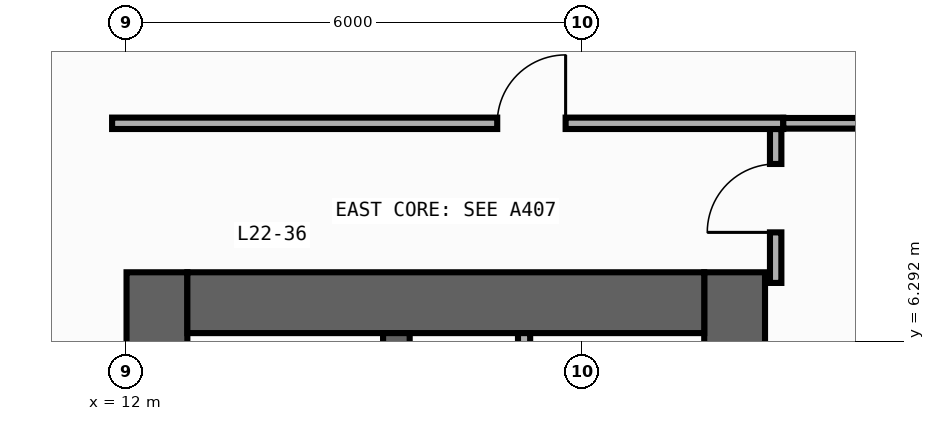
"""IFC4 building model, lengths in metres.
Left out: names, types, materials, properties, quantities, classifications, styles, units other than length and angle.
Written with IfcOpenShell. Run it as: python <this file> out.ifc"""

import sys

from ifc_helpers import new_model, si_unit, direction, frame, frame_2d, origin, place, context, subcontext, project, spatial, rectangle, extrude, element, fill, save


model = new_model("IFC4")
c1 = context("Model", 3, precision=1e-05, world=origin(), true_north=direction((0.0, 1.0)))
c2 = subcontext(c1, "Body", "Model", "MODEL_VIEW")
j1 = project(units=[si_unit("LENGTHUNIT", "METRE"), si_unit("PLANEANGLEUNIT", "RADIAN")], contexts=[c1])
p1 = place(None, origin())
s1 = spatial("IfcSite", under=j1, at=p1, CompositionType="ELEMENT")
p2 = place(p1, origin())
s2 = spatial("IfcBuilding", under=s1, at=p2, CompositionType="ELEMENT")
p3 = place(p2, frame((0.0, 0.0, 97.4)))
s3 = spatial("IfcBuildingStorey", under=s2, at=p3, CompositionType="ELEMENT", Elevation=97.4)
p4 = place(p3, frame((12.4, -19.8, 0.0), z_axis=(0.0, 0.0, 1.0), x_axis=(0.0, 1.0, 0.0)))
e1 = element("IfcWall", 1, at=p4, inside=s3, PredefinedType="SHEAR", context=c2, shape_type="SweptSolid", body=[
    extrude(rectangle(XDim=27.0, YDim=0.8, at=frame_2d((13.5, 0.0))), origin(), (0.0, 0.0, 1.0), 3.94),
])
p5 = place(p4, frame((23.05, 0.0, 0.0)))
e2 = element("IfcOpeningElement", 2, at=p5, cuts=e1, PredefinedType="OPENING", context=c2, shape_type="SweptSolid", body=[
    extrude(rectangle(XDim=1.1, YDim=2.2, at=frame_2d((0.55, 1.1))), frame((0.0, 0.41, 0.0), z_axis=(0.0, -1.0, 0.0), x_axis=(1.0, 0.0, 0.0)), (0.0, 0.0, 1.0), 0.82),
])
p6 = place(p4, frame((19.85, 0.0, 0.0)))
e3 = element("IfcOpeningElement", 3, at=p6, cuts=e1, PredefinedType="OPENING", context=c2, shape_type="SweptSolid", body=[
    extrude(rectangle(XDim=1.1, YDim=2.2, at=frame_2d((0.55, 1.1))), frame((0.0, 0.41, 0.0), z_axis=(0.0, -1.0, 0.0), x_axis=(1.0, 0.0, 0.0)), (0.0, 0.0, 1.0), 0.82),
])
p7 = place(p4, frame((16.65, 0.0, 0.0)))
e4 = element("IfcOpeningElement", 4, at=p7, cuts=e1, PredefinedType="OPENING", context=c2, shape_type="SweptSolid", body=[
    extrude(rectangle(XDim=1.1, YDim=2.2, at=frame_2d((0.55, 1.1))), frame((0.0, 0.41, 0.0), z_axis=(0.0, -1.0, 0.0), x_axis=(1.0, 0.0, 0.0)), (0.0, 0.0, 1.0), 0.82),
])
p8 = place(p4, frame((6.275, 0.0, 0.0)))
e5 = element("IfcOpeningElement", 5, at=p8, cuts=e1, PredefinedType="OPENING", context=c2, shape_type="SweptSolid", body=[
    extrude(rectangle(XDim=0.85, YDim=2.1, at=frame_2d((0.425, 1.05))), frame((0.0, 0.41, 0.0), z_axis=(0.0, -1.0, 0.0), x_axis=(1.0, 0.0, 0.0)), (0.0, 0.0, 1.0), 0.82),
])
p9 = place(p4, frame((8.575, 0.0, 0.0)))
e6 = element("IfcOpeningElement", 6, at=p9, cuts=e1, PredefinedType="OPENING", context=c2, shape_type="SweptSolid", body=[
    extrude(rectangle(XDim=0.85, YDim=2.1, at=frame_2d((0.425, 1.05))), frame((0.0, 0.41, 0.0), z_axis=(0.0, -1.0, 0.0), x_axis=(1.0, 0.0, 0.0)), (0.0, 0.0, 1.0), 0.82),
])
p10 = place(p4, frame((10.675, 0.0, 0.0)))
e7 = element("IfcOpeningElement", 7, at=p10, cuts=e1, PredefinedType="OPENING", context=c2, shape_type="SweptSolid", body=[
    extrude(rectangle(XDim=0.85, YDim=2.1, at=frame_2d((0.425, 1.05))), frame((0.0, 0.41, 0.0), z_axis=(0.0, -1.0, 0.0), x_axis=(1.0, 0.0, 0.0)), (0.0, 0.0, 1.0), 0.82),
])
p11 = place(p4, frame((12.725, 0.0, 0.0)))
e8 = element("IfcOpeningElement", 8, at=p11, cuts=e1, PredefinedType="OPENING", context=c2, shape_type="SweptSolid", body=[
    extrude(rectangle(XDim=1.15, YDim=2.2, at=frame_2d((0.575, 1.1))), frame((0.0, 0.41, 0.0), z_axis=(0.0, -1.0, 0.0), x_axis=(1.0, 0.0, 0.0)), (0.0, 0.0, 1.0), 0.82),
])
p12 = place(p4, frame((25.125, 0.0, 0.0)))
e9 = element("IfcOpeningElement", 9, at=p12, cuts=e1, PredefinedType="OPENING", context=c2, shape_type="SweptSolid", body=[
    extrude(rectangle(XDim=0.85, YDim=2.1, at=frame_2d((0.425, 1.05))), frame((0.0, 0.41, 0.0), z_axis=(0.0, -1.0, 0.0), x_axis=(1.0, 0.0, 0.0)), (0.0, 0.0, 1.0), 0.82),
])
p13 = place(p3, frame((20.0, -19.8, 0.0), z_axis=(0.0, 0.0, 1.0), x_axis=(0.0, 1.0, 0.0)))
e10 = element("IfcWall", 10, at=p13, inside=s3, PredefinedType="SHEAR", context=c2, shape_type="SweptSolid", body=[
    extrude(rectangle(XDim=27.0, YDim=0.8, at=frame_2d((13.5, 0.0))), origin(), (0.0, 0.0, 1.0), 3.94),
])
p14 = place(p3, frame((12.8, 6.8, 0.0), z_axis=(0.0, 0.0, 1.0), x_axis=(1.0, 0.0, 0.0)))
e11 = element("IfcWall", 11, at=p14, inside=s3, PredefinedType="SHEAR", context=c2, shape_type="SweptSolid", body=[
    extrude(rectangle(XDim=6.8, YDim=0.8, at=frame_2d((3.4, 0.0))), origin(), (0.0, 0.0, 1.0), 3.94),
])
p15 = place(p3, frame((15.55, -19.0, 0.0), z_axis=(0.0, 0.0, 1.0), x_axis=(0.0, 1.0, 0.0)))
e12 = element("IfcWall", 12, at=p15, inside=s3, PredefinedType="SHEAR", context=c2, shape_type="SweptSolid", body=[
    extrude(rectangle(XDim=25.4, YDim=0.35, at=frame_2d((12.7, 0.0))), origin(), (0.0, 0.0, 1.0), 3.94),
])
p16 = place(p15, frame((11.925, 0.0, 0.0)))
e13 = element("IfcOpeningElement", 13, at=p16, cuts=e12, PredefinedType="OPENING", context=c2, shape_type="SweptSolid", body=[
    extrude(rectangle(XDim=1.15, YDim=2.2, at=frame_2d((0.575, 1.1))), frame((0.0, 0.185, 0.0), z_axis=(0.0, -1.0, 0.0), x_axis=(1.0, 0.0, 0.0)), (0.0, 0.0, 1.0), 0.37),
])
p17 = place(p15, frame((24.325, 0.0, 0.0)))
e14 = element("IfcOpeningElement", 14, at=p17, cuts=e12, PredefinedType="OPENING", context=c2, shape_type="SweptSolid", body=[
    extrude(rectangle(XDim=0.85, YDim=2.1, at=frame_2d((0.425, 1.05))), frame((0.0, 0.185, 0.0), z_axis=(0.0, -1.0, 0.0), x_axis=(1.0, 0.0, 0.0)), (0.0, 0.0, 1.0), 0.37),
])
p18 = place(p3, frame((17.23, 4.17, 0.0), z_axis=(0.0, 0.0, 1.0), x_axis=(0.0, 1.0, 0.0)))
e15 = element("IfcWall", 15, at=p18, inside=s3, PredefinedType="PARTITIONING", context=c2, shape_type="SweptSolid", body=[
    extrude(rectangle(XDim=2.23, YDim=0.16, at=frame_2d((1.115, 0.0))), origin(), (0.0, 0.0, 1.0), 3.94),
])
p19 = place(p18, frame((0.46, 0.0, 0.0)))
e16 = element("IfcOpeningElement", 16, at=p19, cuts=e15, PredefinedType="OPENING", context=c2, shape_type="SweptSolid", body=[
    extrude(rectangle(XDim=0.85, YDim=2.1, at=frame_2d((0.425, 1.05))), frame((0.0, 0.09, 0.0), z_axis=(0.0, -1.0, 0.0), x_axis=(1.0, 0.0, 0.0)), (0.0, 0.0, 1.0), 0.18),
])
p20 = place(p3, frame((20.54, 7.06, 0.0), z_axis=(0.0, 0.0, 1.0), x_axis=(0.0, 1.0, 0.0)))
e17 = element("IfcWall", 17, at=p20, inside=s3, PredefinedType="PARTITIONING", context=c2, shape_type="SweptSolid", body=[
    extrude(rectangle(XDim=2.025, YDim=0.15, at=frame_2d((1.012, 0.0))), origin(), (0.0, 0.0, 1.0), 3.94),
])
p21 = place(p20, frame((0.665, 0.0, 0.0)))
e18 = element("IfcOpeningElement", 18, at=p21, cuts=e17, PredefinedType="OPENING", context=c2, shape_type="SweptSolid", body=[
    extrude(rectangle(XDim=0.9, YDim=2.15, at=frame_2d((0.45, 1.075))), frame((0.0, 0.085, 0.0), z_axis=(0.0, -1.0, 0.0), x_axis=(1.0, 0.0, 0.0)), (0.0, 0.0, 1.0), 0.17),
])
p22 = place(p3, frame((11.81, 9.16, 0.0), z_axis=(0.0, 0.0, 1.0), x_axis=(1.0, 0.0, 0.0)))
e19 = element("IfcWall", 19, at=p22, inside=s3, PredefinedType="PARTITIONING", context=c2, shape_type="SweptSolid", body=[
    extrude(rectangle(XDim=8.83, YDim=0.15, at=frame_2d((4.415, 0.0))), origin(), (0.0, 0.0, 1.0), 3.94),
])
p23 = place(p22, frame((5.067, 0.0, 0.0)))
e20 = element("IfcOpeningElement", 20, at=p23, cuts=e19, PredefinedType="OPENING", context=c2, shape_type="SweptSolid", body=[
    extrude(rectangle(XDim=0.9, YDim=2.15, at=frame_2d((0.45, 1.075))), frame((0.0, 0.085, 0.0), z_axis=(0.0, -1.0, 0.0), x_axis=(1.0, 0.0, 0.0)), (0.0, 0.0, 1.0), 0.17),
])
p24 = place(p3, frame((20.64, 9.16, 0.0), z_axis=(0.0, 0.0, 1.0), x_axis=(1.0, 0.0, 0.0)))
e21 = element("IfcWall", 21, at=p24, inside=s3, PredefinedType="PARTITIONING", context=c2, shape_type="SweptSolid", body=[
    extrude(rectangle(XDim=2.815, YDim=0.14, at=frame_2d((1.408, 0.0))), origin(), (0.0, 0.0, 1.0), 3.94),
])
p25 = place(p21, origin())
e22 = element("IfcDoor", 22, at=p25, inside=s3, OperationType="SINGLE_SWING_LEFT", PredefinedType="DOOR", context=c2, shape_type="SweptSolid", body=[
    extrude(rectangle(XDim=0.9, YDim=2.15, at=frame_2d((0.45, 1.075))), frame((0.0, 0.025, 0.0), z_axis=(0.0, -1.0, 0.0), x_axis=(1.0, 0.0, 0.0)), (0.0, 0.0, 1.0), 0.05),
])
fill(e18, e22)
p26 = place(p23, origin())
e23 = element("IfcDoor", 23, at=p26, inside=s3, OperationType="SINGLE_SWING_RIGHT", PredefinedType="DOOR", context=c2, shape_type="SweptSolid", body=[
    extrude(rectangle(XDim=0.9, YDim=2.15, at=frame_2d((0.45, 1.075))), frame((0.0, 0.025, 0.0), z_axis=(0.0, -1.0, 0.0), x_axis=(1.0, 0.0, 0.0)), (0.0, 0.0, 1.0), 0.05),
])
fill(e20, e23)
save(model, sys.argv[1])
